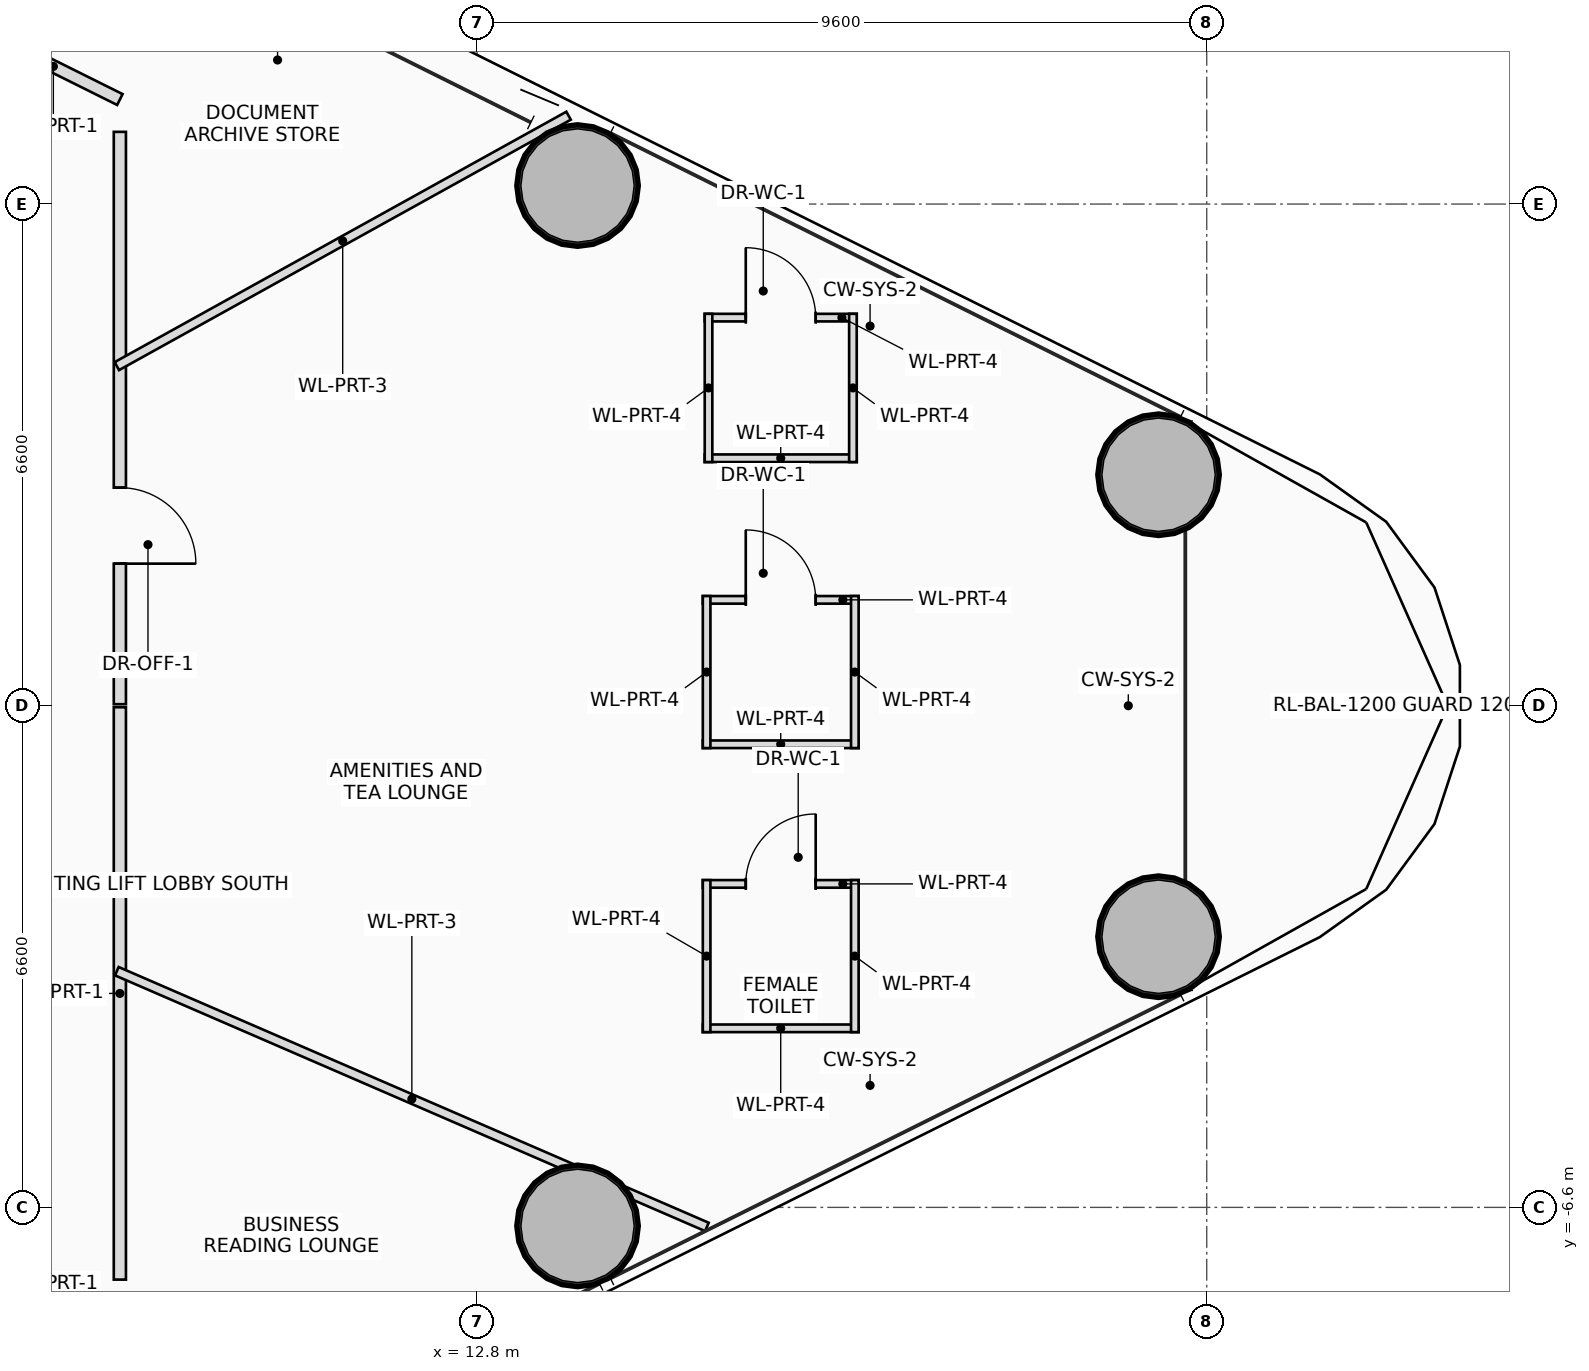
"""IFC4 building model, lengths in metres.
Left out: names, types, materials, properties, quantities, classifications, styles, units other than length and angle.
Written with IfcOpenShell. Run it as: python <this file> out.ifc"""

import sys

from ifc_helpers import new_model, si_unit, direction, frame, frame_2d, origin, origin_2d, place, context, subcontext, project, spatial, rectangle, hollow_circle, extrude, source, transform, mapped, element, fill, save


model = new_model("IFC4")
c1 = context("Model", 3, precision=1e-05, world=origin(), true_north=direction((0.0, 1.0)))
c2 = subcontext(c1, "Body", "Model", "MODEL_VIEW")
j1 = project(units=[si_unit("LENGTHUNIT", "METRE"), si_unit("PLANEANGLEUNIT", "RADIAN")], contexts=[c1])
p1 = place(None, origin())
s1 = spatial("IfcSite", under=j1, at=p1, CompositionType="ELEMENT")
p2 = place(p1, origin())
s2 = spatial("IfcBuilding", under=s1, at=p2, CompositionType="ELEMENT")
p3 = place(p2, frame((0.0, 0.0, 31.2)))
s3 = spatial("IfcBuildingStorey", under=s2, at=p3, CompositionType="ELEMENT", Elevation=31.2)
m1 = source(origin(), c2, "Body", "SweptSolid", [
    extrude(hollow_circle(Radius=0.8, WallThickness=0.055, at=origin_2d()), origin(), (0.0, 0.0, 1.0), 3.7),
])
for number, where, z_axis, x_axis in (
    (1, (14.122, -6.844, 0.0), (0.0, 0.0, 1.0), (1.0, 0.0, 0.0)),
    (2, (21.766, -3.039, 0.0), (0.0, 0.0, 1.0), (1.0, 0.0, 0.0)),
    (3, (21.766, 3.039, 0.0), (0.0, 0.0, 1.0), (1.0, 0.0, 0.0)),
    (4, (14.122, 6.844, 0.0), (0.0, 0.0, 1.0), (1.0, 0.0, 0.0)),
):
    element("IfcColumn", number, at=place(p3, frame(where, z_axis=z_axis, x_axis=x_axis)), inside=s3, PredefinedType="COLUMN", context=c2, shape_type="MappedRepresentation", body=[
        mapped(m1, transform((0.0, 0.0, 0.0), scale=1.0)),
    ])
p4 = place(p3, frame((15.77, 1.393, 0.0), z_axis=(0.0, 0.0, 1.0), x_axis=(1.0, 0.0, 0.0)))
e5 = element("IfcWall", 5, at=p4, inside=s3, PredefinedType="PARTITIONING", context=c2, shape_type="SweptSolid", body=[
    extrude(rectangle(XDim=2.05, YDim=0.1, at=frame_2d((1.025, 0.0))), origin(), (0.0, 0.0, 1.0), 3.15),
])
p5 = place(p4, frame((0.565, 0.0, 0.0)))
e6 = element("IfcOpeningElement", 6, at=p5, cuts=e5, PredefinedType="OPENING", context=c2, shape_type="SweptSolid", body=[
    extrude(rectangle(XDim=0.92, YDim=2.1, at=frame_2d((0.46, 1.05))), frame((0.0, 0.06, 0.0), z_axis=(0.0, -1.0, 0.0), x_axis=(1.0, 0.0, 0.0)), (0.0, 0.0, 1.0), 0.12),
])
p6 = place(p3, frame((17.82, -0.507, 0.0), z_axis=(0.0, 0.0, 1.0), x_axis=(-1.0, 0.0, 0.0)))
e7 = element("IfcWall", 7, at=p6, inside=s3, PredefinedType="PARTITIONING", context=c2, shape_type="SweptSolid", body=[
    extrude(rectangle(XDim=2.05, YDim=0.1, at=frame_2d((1.025, 0.0))), origin(), (0.0, 0.0, 1.0), 3.15),
])
p7 = place(p3, frame((17.77, 1.443, 0.0), z_axis=(0.0, 0.0, 1.0), x_axis=(0.0, -1.0, 0.0)))
e8 = element("IfcWall", 8, at=p7, inside=s3, PredefinedType="PARTITIONING", context=c2, shape_type="SweptSolid", body=[
    extrude(rectangle(XDim=2.0, YDim=0.1, at=frame_2d((1.0, 0.0))), origin(), (0.0, 0.0, 1.0), 3.15),
])
p8 = place(p3, frame((15.82, -0.557, 0.0), z_axis=(0.0, 0.0, 1.0), x_axis=(0.0, 1.0, 0.0)))
e9 = element("IfcWall", 9, at=p8, inside=s3, PredefinedType="PARTITIONING", context=c2, shape_type="SweptSolid", body=[
    extrude(rectangle(XDim=2.0, YDim=0.1, at=frame_2d((1.0, 0.0))), origin(), (0.0, 0.0, 1.0), 3.495),
])
p9 = place(p3, frame((15.77, -2.344, 0.0), z_axis=(0.0, 0.0, 1.0), x_axis=(1.0, 0.0, 0.0)))
e10 = element("IfcWall", 10, at=p9, inside=s3, PredefinedType="PARTITIONING", context=c2, shape_type="SweptSolid", body=[
    extrude(rectangle(XDim=2.05, YDim=0.1, at=frame_2d((1.025, 0.0))), origin(), (0.0, 0.0, 1.0), 3.15),
])
p10 = place(p9, frame((0.565, 0.0, 0.0)))
e11 = element("IfcOpeningElement", 11, at=p10, cuts=e10, PredefinedType="OPENING", context=c2, shape_type="SweptSolid", body=[
    extrude(rectangle(XDim=0.92, YDim=2.1, at=frame_2d((0.46, 1.05))), frame((0.0, 0.06, 0.0), z_axis=(0.0, -1.0, 0.0), x_axis=(1.0, 0.0, 0.0)), (0.0, 0.0, 1.0), 0.12),
])
p11 = place(p3, frame((17.82, -4.244, 0.0), z_axis=(0.0, 0.0, 1.0), x_axis=(-1.0, 0.0, 0.0)))
e12 = element("IfcWall", 12, at=p11, inside=s3, PredefinedType="PARTITIONING", context=c2, shape_type="SweptSolid", body=[
    extrude(rectangle(XDim=2.05, YDim=0.1, at=frame_2d((1.025, 0.0))), origin(), (0.0, 0.0, 1.0), 3.495),
])
for number, where, z_axis, x_axis in (
    (13, (17.77, -2.294, 0.0), (0.0, 0.0, 1.0), (0.0, -1.0, 0.0)),
    (14, (15.82, -4.294, 0.0), (0.0, 0.0, 1.0), (0.0, 1.0, 0.0)),
):
    element("IfcWall", number, at=place(p3, frame(where, z_axis=z_axis, x_axis=x_axis)), inside=s3, PredefinedType="PARTITIONING", context=c2, shape_type="SweptSolid", body=[
        extrude(rectangle(XDim=2.0, YDim=0.1, at=frame_2d((1.0, 0.0))), origin(), (0.0, 0.0, 1.0), 2.8),
    ])
p12 = place(p3, frame((15.795, 5.106, 0.0), z_axis=(0.0, 0.0, 1.0), x_axis=(1.0, 0.0, 0.0)))
e15 = element("IfcWall", 15, at=p12, inside=s3, PredefinedType="PARTITIONING", context=c2, shape_type="SweptSolid", body=[
    extrude(rectangle(XDim=2.0, YDim=0.1, at=frame_2d((1.0, 0.0))), origin(), (0.0, 0.0, 1.0), 2.96),
])
p13 = place(p12, frame((0.54, 0.0, 0.0)))
e16 = element("IfcOpeningElement", 16, at=p13, cuts=e15, PredefinedType="OPENING", context=c2, shape_type="SweptSolid", body=[
    extrude(rectangle(XDim=0.92, YDim=2.1, at=frame_2d((0.46, 1.05))), frame((0.0, 0.06, 0.0), z_axis=(0.0, -1.0, 0.0), x_axis=(1.0, 0.0, 0.0)), (0.0, 0.0, 1.0), 0.12),
])
p14 = place(p3, frame((17.795, 3.256, 0.0), z_axis=(0.0, 0.0, 1.0), x_axis=(-1.0, 0.0, 0.0)))
e17 = element("IfcWall", 17, at=p14, inside=s3, PredefinedType="PARTITIONING", context=c2, shape_type="SweptSolid", body=[
    extrude(rectangle(XDim=2.0, YDim=0.1, at=frame_2d((1.0, 0.0))), origin(), (0.0, 0.0, 1.0), 3.15),
])
for number, where, z_axis, x_axis in (
    (18, (17.745, 5.156, 0.0), (0.0, 0.0, 1.0), (0.0, -1.0, 0.0)),
    (19, (15.845, 3.206, 0.0), (0.0, 0.0, 1.0), (0.0, 1.0, 0.0)),
):
    element("IfcWall", number, at=place(p3, frame(where, z_axis=z_axis, x_axis=x_axis)), inside=s3, PredefinedType="PARTITIONING", context=c2, shape_type="SweptSolid", body=[
        extrude(rectangle(XDim=1.95, YDim=0.1, at=frame_2d((0.975, 0.0))), origin(), (0.0, 0.0, 1.0), 2.8),
    ])
p15 = place(p3, frame((6.35, 8.846, 0.0), z_axis=(0.0, 0.0, 1.0), x_axis=(0.89527489017, -0.445514164793, 0.0)))
e20 = element("IfcWall", 20, at=p15, inside=s3, PredefinedType="PARTITIONING", context=c2, shape_type="SweptSolid", body=[
    extrude(rectangle(XDim=1.955, YDim=0.16, at=frame_2d((0.977, 0.0))), origin(), (0.0, 0.0, 1.0), 2.8),
])
p16 = place(p3, frame((8.1, 7.55, 0.0), z_axis=(0.0, 0.0, 1.0), x_axis=(0.0, -1.0, 0.0)))
e21 = element("IfcWall", 21, at=p16, inside=s3, PredefinedType="PARTITIONING", context=c2, shape_type="SweptSolid", body=[
    extrude(rectangle(XDim=7.53, YDim=0.16, at=frame_2d((3.765, 0.0))), origin(), (0.0, 0.0, 1.0), 2.8),
])
p17 = place(p16, frame((4.681, 0.0, 0.0)))
e22 = element("IfcOpeningElement", 22, at=p17, cuts=e21, PredefinedType="OPENING", context=c2, shape_type="SweptSolid", body=[
    extrude(rectangle(XDim=1.0, YDim=2.25, at=frame_2d((0.5, 1.125))), frame((0.0, 0.09, 0.0), z_axis=(0.0, -1.0, 0.0), x_axis=(1.0, 0.0, 0.0)), (0.0, 0.0, 1.0), 0.18),
])
p18 = place(p3, frame((8.1, -0.02, 0.0), z_axis=(0.0, 0.0, 1.0), x_axis=(0.0, -1.0, 0.0)))
e23 = element("IfcWall", 23, at=p18, inside=s3, PredefinedType="PARTITIONING", context=c2, shape_type="SweptSolid", body=[
    extrude(rectangle(XDim=7.53, YDim=0.16, at=frame_2d((3.765, 0.0))), origin(), (0.0, 0.0, 1.0), 2.8),
])
p19 = place(p3, frame((8.06, 4.468, 0.0), z_axis=(0.0, 0.0, 1.0), x_axis=(0.874622878111, 0.484803899618, 0.0)))
e24 = element("IfcWall", 24, at=p19, inside=s3, PredefinedType="PARTITIONING", context=c2, shape_type="SweptSolid", body=[
    extrude(rectangle(XDim=6.796, YDim=0.12, at=frame_2d((3.398, 0.0))), origin(), (0.0, 0.0, 1.0), 2.8),
])
p20 = place(p3, frame((8.06, -3.493, 0.0), z_axis=(0.0, 0.0, 1.0), x_axis=(0.917561590562, -0.397593671385, 0.0)))
e25 = element("IfcWall", 25, at=p20, inside=s3, PredefinedType="PARTITIONING", context=c2, shape_type="SweptSolid", body=[
    extrude(rectangle(XDim=8.461, YDim=0.12, at=frame_2d((4.23, 0.0))), origin(), (0.0, 0.0, 1.0), 2.8),
])
p21 = place(p5, origin())
e26 = element("IfcDoor", 26, at=p21, inside=s3, OperationType="SINGLE_SWING_LEFT", PredefinedType="DOOR", context=c2, shape_type="SweptSolid", body=[
    extrude(rectangle(XDim=0.92, YDim=2.1, at=frame_2d((0.46, 1.05))), frame((0.0, 0.025, 0.0), z_axis=(0.0, -1.0, 0.0), x_axis=(1.0, 0.0, 0.0)), (0.0, 0.0, 1.0), 0.05),
])
fill(e6, e26)
p22 = place(p10, origin())
e27 = element("IfcDoor", 27, at=p22, inside=s3, OperationType="SINGLE_SWING_RIGHT", PredefinedType="DOOR", context=c2, shape_type="SweptSolid", body=[
    extrude(rectangle(XDim=0.92, YDim=2.1, at=frame_2d((0.46, 1.05))), frame((0.0, 0.025, 0.0), z_axis=(0.0, -1.0, 0.0), x_axis=(1.0, 0.0, 0.0)), (0.0, 0.0, 1.0), 0.05),
])
fill(e11, e27)
p23 = place(p13, origin())
e28 = element("IfcDoor", 28, at=p23, inside=s3, OperationType="SINGLE_SWING_LEFT", PredefinedType="DOOR", context=c2, shape_type="SweptSolid", body=[
    extrude(rectangle(XDim=0.92, YDim=2.1, at=frame_2d((0.46, 1.05))), frame((0.0, 0.025, 0.0), z_axis=(0.0, -1.0, 0.0), x_axis=(1.0, 0.0, 0.0)), (0.0, 0.0, 1.0), 0.05),
])
fill(e16, e28)
p24 = place(p17, origin())
e29 = element("IfcDoor", 29, at=p24, inside=s3, OperationType="SINGLE_SWING_RIGHT", PredefinedType="DOOR", context=c2, shape_type="SweptSolid", body=[
    extrude(rectangle(XDim=1.0, YDim=2.25, at=frame_2d((0.5, 1.125))), frame((0.0, 0.025, 0.0), z_axis=(0.0, -1.0, 0.0), x_axis=(1.0, 0.0, 0.0)), (0.0, 0.0, 1.0), 0.05),
])
fill(e22, e29)
save(model, sys.argv[1])
